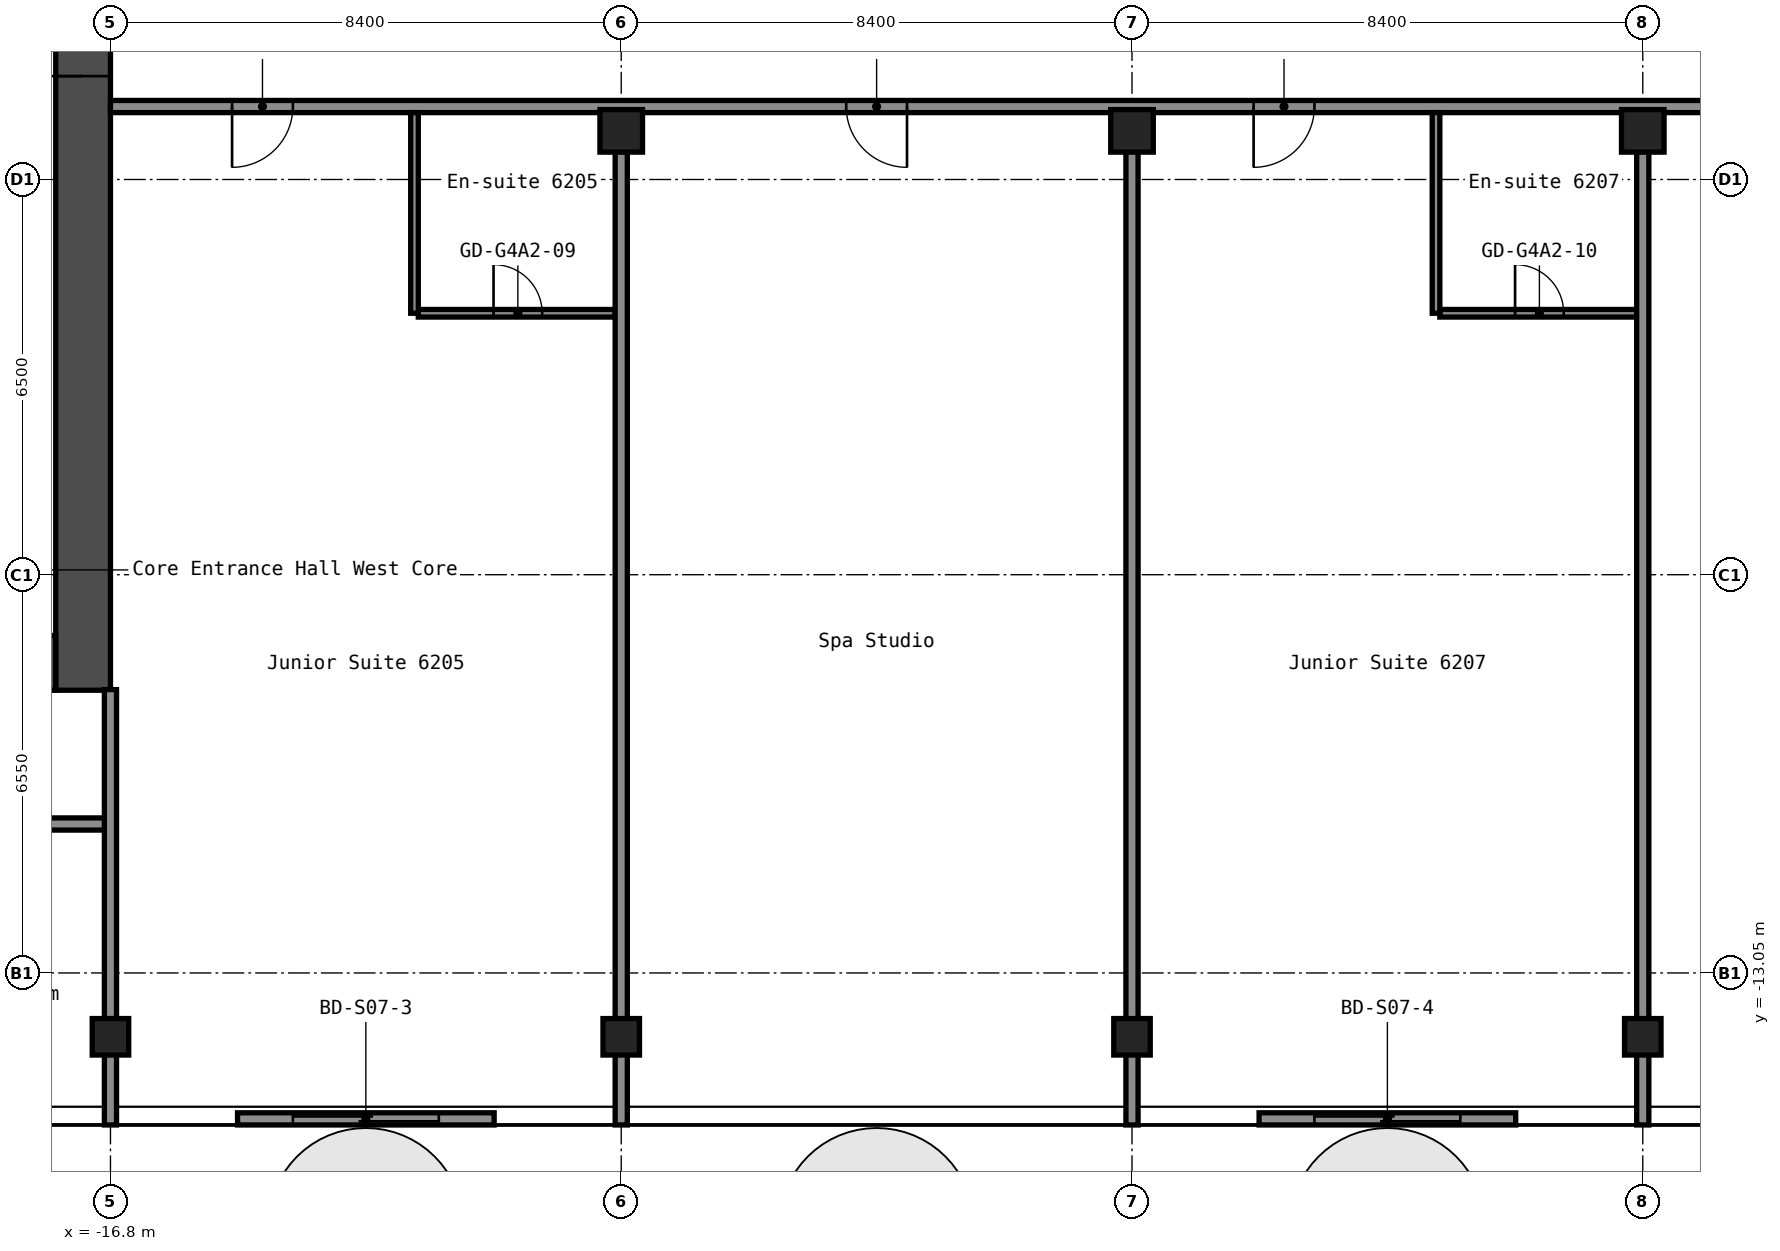
"""IFC4 building model, lengths in metres.
Left out: names, types, materials, properties, quantities, classifications, styles, units other than length and angle.
Written with IfcOpenShell. Run it as: python <this file> out.ifc"""

import sys

from ifc_helpers import new_model, si_unit, direction, frame, frame_2d, origin, origin_2d, place, context, subcontext, project, spatial, rectangle, hollow_rectangle, extrude, element, fill, save


model = new_model("IFC4")
c1 = context("Model", 3, precision=1e-05, world=origin(), true_north=direction((0.0, 1.0)))
c2 = subcontext(c1, "Body", "Model", "MODEL_VIEW")
j1 = project(units=[si_unit("LENGTHUNIT", "METRE"), si_unit("PLANEANGLEUNIT", "RADIAN")], contexts=[c1])
p1 = place(None, origin())
s1 = spatial("IfcSite", under=j1, at=p1, CompositionType="ELEMENT")
p2 = place(p1, origin())
s2 = spatial("IfcBuilding", under=s1, at=p2, CompositionType="ELEMENT")
p3 = place(p2, frame((0.0, 0.0, 218.6)))
s3 = spatial("IfcBuildingStorey", under=s2, at=p3, CompositionType="ELEMENT", Elevation=218.6)
for number, where, z_axis, x_axis in (
    (1, (-16.8, -14.1, 0.0), (0.0, 0.0, 1.0), (1.0, 0.0, 0.0)),
    (2, (-8.4, -14.1, 0.0), (0.0, 0.0, 1.0), (1.0, 0.0, 0.0)),
):
    element("IfcColumn", number, at=place(p3, frame(where, z_axis=z_axis, x_axis=x_axis)), inside=s3, PredefinedType="COLUMN", context=c2, shape_type="SweptSolid", body=[
        extrude(hollow_rectangle(XDim=0.6, YDim=0.6, WallThickness=0.025, InnerFilletRadius=0.038, OuterFilletRadius=0.062, at=origin_2d()), origin(), (0.0, 0.0, 1.0), 2.75),
    ])
p4 = place(p3, frame((-8.4, 0.8, 0.0), z_axis=(0.0, 0.0, 1.0), x_axis=(1.0, 0.0, 0.0)))
e3 = element("IfcColumn", 3, at=p4, inside=s3, PredefinedType="COLUMN", context=c2, shape_type="SweptSolid", body=[
    extrude(hollow_rectangle(XDim=0.7, YDim=0.7, WallThickness=0.028, at=origin_2d()), origin(), (0.0, 0.0, 1.0), 2.75),
])
p5 = place(p3, frame((0.0, -14.1, 0.0), z_axis=(0.0, 0.0, 1.0), x_axis=(1.0, 0.0, 0.0)))
e4 = element("IfcColumn", 4, at=p5, inside=s3, PredefinedType="COLUMN", context=c2, shape_type="SweptSolid", body=[
    extrude(hollow_rectangle(XDim=0.6, YDim=0.6, WallThickness=0.025, InnerFilletRadius=0.038, OuterFilletRadius=0.062, at=origin_2d()), origin(), (0.0, 0.0, 1.0), 2.75),
])
p6 = place(p3, frame((0.0, 0.8, 0.0), z_axis=(0.0, 0.0, 1.0), x_axis=(1.0, 0.0, 0.0)))
e5 = element("IfcColumn", 5, at=p6, inside=s3, PredefinedType="COLUMN", context=c2, shape_type="SweptSolid", body=[
    extrude(hollow_rectangle(XDim=0.7, YDim=0.7, WallThickness=0.028, at=origin_2d()), origin(), (0.0, 0.0, 1.0), 2.75),
])
p7 = place(p3, frame((8.4, -14.1, 0.0), z_axis=(0.0, 0.0, 1.0), x_axis=(1.0, 0.0, 0.0)))
e6 = element("IfcColumn", 6, at=p7, inside=s3, PredefinedType="COLUMN", context=c2, shape_type="SweptSolid", body=[
    extrude(hollow_rectangle(XDim=0.6, YDim=0.6, WallThickness=0.025, InnerFilletRadius=0.038, OuterFilletRadius=0.062, at=origin_2d()), origin(), (0.0, 0.0, 1.0), 2.75),
])
p8 = place(p3, frame((8.4, 0.8, 0.0), z_axis=(0.0, 0.0, 1.0), x_axis=(1.0, 0.0, 0.0)))
e7 = element("IfcColumn", 7, at=p8, inside=s3, PredefinedType="COLUMN", context=c2, shape_type="SweptSolid", body=[
    extrude(hollow_rectangle(XDim=0.7, YDim=0.7, WallThickness=0.028, at=origin_2d()), origin(), (0.0, 0.0, 1.0), 2.75),
])
p9 = place(p3, frame((-17.25, -8.4, 0.0), z_axis=(0.0, 0.0, 1.0), x_axis=(0.0, 1.0, 0.0)))
e8 = element("IfcWall", 8, at=p9, inside=s3, PredefinedType="SHEAR", context=c2, shape_type="SweptSolid", body=[
    extrude(rectangle(XDim=16.8, YDim=0.9, at=frame_2d((8.4, 0.0))), origin(), (0.0, 0.0, 1.0), 2.75),
])
p10 = place(p9, frame((10.1, 0.0, 0.0)))
e9 = element("IfcOpeningElement", 9, at=p10, cuts=e8, PredefinedType="OPENING", context=c2, shape_type="SweptSolid", body=[
    extrude(rectangle(XDim=1.6, YDim=2.1, at=frame_2d((0.8, 1.05))), frame((0.0, 0.46, 0.0), z_axis=(0.0, -1.0, 0.0), x_axis=(1.0, 0.0, 0.0)), (0.0, 0.0, 1.0), 0.92),
])
p11 = place(p3, frame((-32.7, -7.95, 0.0), z_axis=(0.0, 0.0, 1.0), x_axis=(1.0, 0.0, 0.0)))
e10 = element("IfcWall", 10, at=p11, inside=s3, PredefinedType="SHEAR", context=c2, shape_type="SweptSolid", body=[
    extrude(rectangle(XDim=15.0, YDim=0.9, at=frame_2d((7.5, 0.0))), origin(), (0.0, 0.0, 1.0), 2.75),
])
p12 = place(p11, frame((11.45, 0.0, 0.0)))
e11 = element("IfcOpeningElement", 11, at=p12, cuts=e10, PredefinedType="OPENING", context=c2, shape_type="SweptSolid", body=[
    extrude(rectangle(XDim=1.0, YDim=2.1, at=frame_2d((0.5, 1.05))), frame((0.0, 0.46, 0.0), z_axis=(0.0, -1.0, 0.0), x_axis=(1.0, 0.0, 0.0)), (0.0, 0.0, 1.0), 0.92),
])
p13 = place(p3, frame((-38.1, -10.6, 0.0), z_axis=(0.0, 0.0, 1.0), x_axis=(1.0, 0.0, 0.0)))
e12 = element("IfcWall", 12, at=p13, inside=s3, PredefinedType="PARTITIONING", context=c2, shape_type="SweptSolid", body=[
    extrude(rectangle(XDim=21.3, YDim=0.2, at=frame_2d((10.65, 0.0))), origin(), (0.0, 0.0, 1.0), 2.75),
])
p14 = place(p13, frame((1.95, 0.0, 0.0)))
e13 = element("IfcOpeningElement", 13, at=p14, cuts=e12, PredefinedType="OPENING", context=c2, shape_type="SweptSolid", body=[
    extrude(rectangle(XDim=0.9, YDim=2.1, at=frame_2d((0.45, 1.05))), frame((0.0, 0.11, 0.0), z_axis=(0.0, -1.0, 0.0), x_axis=(1.0, 0.0, 0.0)), (0.0, 0.0, 1.0), 0.22),
])
p15 = place(p13, frame((8.2, 0.0, 0.0)))
e14 = element("IfcOpeningElement", 14, at=p15, cuts=e12, PredefinedType="OPENING", context=c2, shape_type="SweptSolid", body=[
    extrude(rectangle(XDim=1.0, YDim=2.1, at=frame_2d((0.5, 1.05))), frame((0.0, 0.11, 0.0), z_axis=(0.0, -1.0, 0.0), x_axis=(1.0, 0.0, 0.0)), (0.0, 0.0, 1.0), 0.22),
])
p16 = place(p13, frame((14.215, 0.0, 0.0)))
e15 = element("IfcOpeningElement", 15, at=p16, cuts=e12, PredefinedType="OPENING", context=c2, shape_type="SweptSolid", body=[
    extrude(rectangle(XDim=0.9, YDim=2.1, at=frame_2d((0.45, 1.05))), frame((0.0, 0.11, 0.0), z_axis=(0.0, -1.0, 0.0), x_axis=(1.0, 0.0, 0.0)), (0.0, 0.0, 1.0), 0.22),
])
p17 = place(p13, frame((18.415, 0.0, 0.0)))
e16 = element("IfcOpeningElement", 16, at=p17, cuts=e12, PredefinedType="OPENING", context=c2, shape_type="SweptSolid", body=[
    extrude(rectangle(XDim=0.9, YDim=2.1, at=frame_2d((0.45, 1.05))), frame((0.0, 0.11, 0.0), z_axis=(0.0, -1.0, 0.0), x_axis=(1.0, 0.0, 0.0)), (0.0, 0.0, 1.0), 0.22),
])
p18 = place(p3, frame((-11.738, -2.2, 0.0), z_axis=(0.0, 0.0, 1.0), x_axis=(1.0, 0.0, 0.0)))
e17 = element("IfcWall", 17, at=p18, inside=s3, PredefinedType="PARTITIONING", context=c2, shape_type="SweptSolid", body=[
    extrude(rectangle(XDim=3.238, YDim=0.125, at=frame_2d((1.619, 0.0))), origin(), (0.0, 0.0, 1.0), 2.75),
])
p19 = place(p18, frame((1.238, 0.0, 0.0)))
e18 = element("IfcOpeningElement", 18, at=p19, cuts=e17, PredefinedType="OPENING", context=c2, shape_type="SweptSolid", body=[
    extrude(rectangle(XDim=0.8, YDim=2.1, at=frame_2d((0.4, 1.05))), frame((0.0, 0.073, 0.0), z_axis=(0.0, -1.0, 0.0), x_axis=(1.0, 0.0, 0.0)), (0.0, 0.0, 1.0), 0.145),
])
p20 = place(p3, frame((5.062, -2.2, 0.0), z_axis=(0.0, 0.0, 1.0), x_axis=(1.0, 0.0, 0.0)))
e19 = element("IfcWall", 19, at=p20, inside=s3, PredefinedType="PARTITIONING", context=c2, shape_type="SweptSolid", body=[
    extrude(rectangle(XDim=3.238, YDim=0.125, at=frame_2d((1.619, 0.0))), origin(), (0.0, 0.0, 1.0), 2.75),
])
p21 = place(p20, frame((1.238, 0.0, 0.0)))
e20 = element("IfcOpeningElement", 20, at=p21, cuts=e19, PredefinedType="OPENING", context=c2, shape_type="SweptSolid", body=[
    extrude(rectangle(XDim=0.8, YDim=2.1, at=frame_2d((0.4, 1.05))), frame((0.0, 0.073, 0.0), z_axis=(0.0, -1.0, 0.0), x_axis=(1.0, 0.0, 0.0)), (0.0, 0.0, 1.0), 0.145),
])
p22 = place(p3, frame((-16.8, 1.2, 0.0), z_axis=(0.0, 0.0, 1.0), x_axis=(1.0, 0.0, 0.0)))
e21 = element("IfcWall", 21, at=p22, inside=s3, PredefinedType="PARTITIONING", context=c2, shape_type="SweptSolid", body=[
    extrude(rectangle(XDim=33.6, YDim=0.2, at=frame_2d((16.8, 0.0))), origin(), (0.0, 0.0, 1.0), 2.75),
])
p23 = place(p22, frame((2.0, 0.0, 0.0)))
e22 = element("IfcOpeningElement", 22, at=p23, cuts=e21, PredefinedType="OPENING", context=c2, shape_type="SweptSolid", body=[
    extrude(rectangle(XDim=1.0, YDim=2.1, at=frame_2d((0.5, 1.05))), frame((0.0, 0.11, 0.0), z_axis=(0.0, -1.0, 0.0), x_axis=(1.0, 0.0, 0.0)), (0.0, 0.0, 1.0), 0.22),
])
p24 = place(p22, frame((12.1, 0.0, 0.0)))
e23 = element("IfcOpeningElement", 23, at=p24, cuts=e21, PredefinedType="OPENING", context=c2, shape_type="SweptSolid", body=[
    extrude(rectangle(XDim=1.0, YDim=2.1, at=frame_2d((0.5, 1.05))), frame((0.0, 0.11, 0.0), z_axis=(0.0, -1.0, 0.0), x_axis=(1.0, 0.0, 0.0)), (0.0, 0.0, 1.0), 0.22),
])
p25 = place(p22, frame((18.8, 0.0, 0.0)))
e24 = element("IfcOpeningElement", 24, at=p25, cuts=e21, PredefinedType="OPENING", context=c2, shape_type="SweptSolid", body=[
    extrude(rectangle(XDim=1.0, YDim=2.1, at=frame_2d((0.5, 1.05))), frame((0.0, 0.11, 0.0), z_axis=(0.0, -1.0, 0.0), x_axis=(1.0, 0.0, 0.0)), (0.0, 0.0, 1.0), 0.22),
])
p26 = place(p22, frame((27.2, 0.0, 0.0)))
e25 = element("IfcOpeningElement", 25, at=p26, cuts=e21, PredefinedType="OPENING", context=c2, shape_type="SweptSolid", body=[
    extrude(rectangle(XDim=1.0, YDim=2.1, at=frame_2d((0.5, 1.05))), frame((0.0, 0.11, 0.0), z_axis=(0.0, -1.0, 0.0), x_axis=(1.0, 0.0, 0.0)), (0.0, 0.0, 1.0), 0.22),
])
p27 = place(p3, frame((-16.8, -15.55, 0.0), z_axis=(0.0, 0.0, 1.0), x_axis=(0.0, 1.0, 0.0)))
e26 = element("IfcWall", 26, at=p27, inside=s3, PredefinedType="PARTITIONING", context=c2, shape_type="SweptSolid", body=[
    extrude(rectangle(XDim=7.16, YDim=0.2, at=frame_2d((3.58, 0.0))), origin(), (0.0, 0.0, 1.0), 2.75),
])
p28 = place(p3, frame((-11.8, -2.2, 0.0), z_axis=(0.0, 0.0, 1.0), x_axis=(0.0, 1.0, 0.0)))
e27 = element("IfcWall", 27, at=p28, inside=s3, PredefinedType="PARTITIONING", context=c2, shape_type="SweptSolid", body=[
    extrude(rectangle(XDim=3.3, YDim=0.125, at=frame_2d((1.65, 0.0))), origin(), (0.0, 0.0, 1.0), 2.75),
])
for number, where, z_axis, x_axis in (
    (28, (-8.4, -15.55, 0.0), (0.0, 0.0, 1.0), (0.0, 1.0, 0.0)),
    (29, (0.0, -15.55, 0.0), (0.0, 0.0, 1.0), (0.0, 1.0, 0.0)),
):
    element("IfcWall", number, at=place(p3, frame(where, z_axis=z_axis, x_axis=x_axis)), inside=s3, PredefinedType="PARTITIONING", context=c2, shape_type="SweptSolid", body=[
        extrude(rectangle(XDim=16.01, YDim=0.2, at=frame_2d((8.005, 0.0))), origin(), (0.0, 0.0, 1.0), 2.75),
    ])
p29 = place(p3, frame((5.0, -2.2, 0.0), z_axis=(0.0, 0.0, 1.0), x_axis=(0.0, 1.0, 0.0)))
e30 = element("IfcWall", 30, at=p29, inside=s3, PredefinedType="PARTITIONING", context=c2, shape_type="SweptSolid", body=[
    extrude(rectangle(XDim=3.3, YDim=0.125, at=frame_2d((1.65, 0.0))), origin(), (0.0, 0.0, 1.0), 2.75),
])
p30 = place(p3, frame((8.4, -15.55, 0.0), z_axis=(0.0, 0.0, 1.0), x_axis=(0.0, 1.0, 0.0)))
e31 = element("IfcWall", 31, at=p30, inside=s3, PredefinedType="PARTITIONING", context=c2, shape_type="SweptSolid", body=[
    extrude(rectangle(XDim=16.01, YDim=0.2, at=frame_2d((8.005, 0.0))), origin(), (0.0, 0.0, 1.0), 2.75),
])
p31 = place(p3, frame((-14.71, -15.45, 0.0), z_axis=(0.0, 0.0, 1.0), x_axis=(1.0, 0.0, 0.0)))
p32 = place(p31, frame((0.91, 0.0, 0.0)))
p33 = place(p32, frame((2.4, 0.0, 0.0), z_axis=(0.0, 0.0, 1.0), x_axis=(-1.0, 0.0, 0.0)))
e32 = element("IfcDoor", 32, at=p33, inside=s3, OperationType="SLIDING_TO_LEFT", PredefinedType="DOOR", context=c2, shape_type="SweptSolid", body=[
    extrude(rectangle(XDim=2.4, YDim=2.2, at=frame_2d((1.2, 1.1))), frame((0.0, 0.025, 0.0), z_axis=(0.0, -1.0, 0.0), x_axis=(1.0, 0.0, 0.0)), (0.0, 0.0, 1.0), 0.05),
])
p34 = place(p3, frame((2.09, -15.45, 0.0), z_axis=(0.0, 0.0, 1.0), x_axis=(1.0, 0.0, 0.0)))
p35 = place(p34, frame((0.91, 0.0, 0.0)))
p36 = place(p35, frame((2.4, 0.0, 0.0), z_axis=(0.0, 0.0, 1.0), x_axis=(-1.0, 0.0, 0.0)))
e33 = element("IfcDoor", 33, at=p36, inside=s3, OperationType="SLIDING_TO_LEFT", PredefinedType="DOOR", context=c2, shape_type="SweptSolid", body=[
    extrude(rectangle(XDim=2.4, YDim=2.2, at=frame_2d((1.2, 1.1))), frame((0.0, 0.025, 0.0), z_axis=(0.0, -1.0, 0.0), x_axis=(1.0, 0.0, 0.0)), (0.0, 0.0, 1.0), 0.05),
])
p37 = place(p10, origin())
e34 = element("IfcDoor", 34, at=p37, inside=s3, OperationType="DOUBLE_DOOR_SINGLE_SWING", PredefinedType="DOOR", context=c2, shape_type="SweptSolid", body=[
    extrude(rectangle(XDim=1.6, YDim=2.1, at=frame_2d((0.8, 1.05))), frame((0.0, 0.025, 0.0), z_axis=(0.0, -1.0, 0.0), x_axis=(1.0, 0.0, 0.0)), (0.0, 0.0, 1.0), 0.05),
])
fill(e9, e34)
p38 = place(p19, origin())
e35 = element("IfcDoor", 35, at=p38, inside=s3, OperationType="SINGLE_SWING_RIGHT", PredefinedType="DOOR", context=c2, shape_type="SweptSolid", body=[
    extrude(rectangle(XDim=0.8, YDim=2.1, at=frame_2d((0.4, 1.05))), frame((0.0, 0.025, 0.0), z_axis=(0.0, -1.0, 0.0), x_axis=(1.0, 0.0, 0.0)), (0.0, 0.0, 1.0), 0.05),
])
fill(e18, e35)
p39 = place(p21, origin())
e36 = element("IfcDoor", 36, at=p39, inside=s3, OperationType="SINGLE_SWING_RIGHT", PredefinedType="DOOR", context=c2, shape_type="SweptSolid", body=[
    extrude(rectangle(XDim=0.8, YDim=2.1, at=frame_2d((0.4, 1.05))), frame((0.0, 0.025, 0.0), z_axis=(0.0, -1.0, 0.0), x_axis=(1.0, 0.0, 0.0)), (0.0, 0.0, 1.0), 0.05),
])
fill(e20, e36)
p40 = place(p23, origin())
e37 = element("IfcDoor", 37, at=p40, inside=s3, OperationType="SINGLE_SWING_LEFT", PredefinedType="DOOR", context=c2, shape_type="SweptSolid", body=[
    extrude(rectangle(XDim=1.0, YDim=2.1, at=frame_2d((0.5, 1.05))), frame((0.0, 0.025, 0.0), z_axis=(0.0, -1.0, 0.0), x_axis=(1.0, 0.0, 0.0)), (0.0, 0.0, 1.0), 0.05),
])
fill(e22, e37)
p41 = place(p24, origin())
e38 = element("IfcDoor", 38, at=p41, inside=s3, OperationType="SINGLE_SWING_RIGHT", PredefinedType="DOOR", context=c2, shape_type="SweptSolid", body=[
    extrude(rectangle(XDim=1.0, YDim=2.1, at=frame_2d((0.5, 1.05))), frame((0.0, 0.025, 0.0), z_axis=(0.0, -1.0, 0.0), x_axis=(1.0, 0.0, 0.0)), (0.0, 0.0, 1.0), 0.05),
])
fill(e23, e38)
p42 = place(p25, origin())
e39 = element("IfcDoor", 39, at=p42, inside=s3, OperationType="SINGLE_SWING_LEFT", PredefinedType="DOOR", context=c2, shape_type="SweptSolid", body=[
    extrude(rectangle(XDim=1.0, YDim=2.1, at=frame_2d((0.5, 1.05))), frame((0.0, 0.025, 0.0), z_axis=(0.0, -1.0, 0.0), x_axis=(1.0, 0.0, 0.0)), (0.0, 0.0, 1.0), 0.05),
])
fill(e24, e39)
save(model, sys.argv[1])
